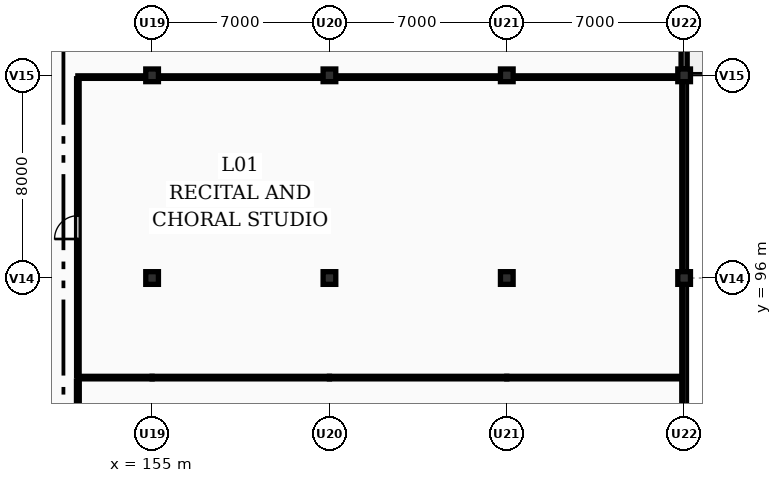
"""IFC4 building model, lengths in metres.
Left out: names, types, materials, properties, quantities, classifications, styles, units other than length and angle.
Written with IfcOpenShell. Run it as: python <this file> out.ifc"""

import sys

from ifc_helpers import new_model, si_unit, direction, frame, frame_2d, origin, origin_2d, place, context, subcontext, project, spatial, rectangle, extrude, element, fill, save


model = new_model("IFC4")
c1 = context("Model", 3, precision=1e-05, world=origin(), true_north=direction((0.0, 1.0)))
c2 = subcontext(c1, "Body", "Model", "MODEL_VIEW")
j1 = project(units=[si_unit("LENGTHUNIT", "METRE"), si_unit("PLANEANGLEUNIT", "RADIAN")], contexts=[c1])
p1 = place(None, origin())
s1 = spatial("IfcSite", under=j1, at=p1, CompositionType="ELEMENT")
p2 = place(p1, origin())
s2 = spatial("IfcBuilding", under=s1, at=p2, CompositionType="ELEMENT")
p3 = place(p2, frame((0.0, 0.0, 4.5)))
s3 = spatial("IfcBuildingStorey", under=s2, at=p3, CompositionType="ELEMENT", Elevation=4.5)
p4 = place(p3, frame((155.0, 96.0, 0.0), z_axis=(0.0, 0.0, 1.0), x_axis=(1.0, 0.0, 0.0)))
e1 = element("IfcColumn", 1, at=p4, inside=s3, PredefinedType="COLUMN", context=c2, shape_type="SweptSolid", body=[
    extrude(rectangle(XDim=0.5, YDim=0.5, at=origin_2d()), origin(), (0.0, 0.0, 1.0), 4.683),
])
p5 = place(p3, frame((155.0, 104.0, 0.0), z_axis=(0.0, 0.0, 1.0), x_axis=(1.0, 0.0, 0.0)))
e2 = element("IfcColumn", 2, at=p5, inside=s3, PredefinedType="COLUMN", context=c2, shape_type="SweptSolid", body=[
    extrude(rectangle(XDim=0.5, YDim=0.5, at=origin_2d()), origin(), (0.0, 0.0, 1.0), 3.9),
])
p6 = place(p3, frame((162.0, 96.0, 0.0), z_axis=(0.0, 0.0, 1.0), x_axis=(1.0, 0.0, 0.0)))
e3 = element("IfcColumn", 3, at=p6, inside=s3, PredefinedType="COLUMN", context=c2, shape_type="SweptSolid", body=[
    extrude(rectangle(XDim=0.5, YDim=0.5, at=origin_2d()), origin(), (0.0, 0.0, 1.0), 5.088),
])
p7 = place(p3, frame((162.0, 104.0, 0.0), z_axis=(0.0, 0.0, 1.0), x_axis=(1.0, 0.0, 0.0)))
e4 = element("IfcColumn", 4, at=p7, inside=s3, PredefinedType="COLUMN", context=c2, shape_type="SweptSolid", body=[
    extrude(rectangle(XDim=0.5, YDim=0.5, at=origin_2d()), origin(), (0.0, 0.0, 1.0), 3.9),
])
p8 = place(p3, frame((169.0, 96.0, 0.0), z_axis=(0.0, 0.0, 1.0), x_axis=(1.0, 0.0, 0.0)))
e5 = element("IfcColumn", 5, at=p8, inside=s3, PredefinedType="COLUMN", context=c2, shape_type="SweptSolid", body=[
    extrude(rectangle(XDim=0.5, YDim=0.5, at=origin_2d()), origin(), (0.0, 0.0, 1.0), 5.493),
])
p9 = place(p3, frame((169.0, 104.0, 0.0), z_axis=(0.0, 0.0, 1.0), x_axis=(1.0, 0.0, 0.0)))
e6 = element("IfcColumn", 6, at=p9, inside=s3, PredefinedType="COLUMN", context=c2, shape_type="SweptSolid", body=[
    extrude(rectangle(XDim=0.5, YDim=0.5, at=origin_2d()), origin(), (0.0, 0.0, 1.0), 3.9),
])
p10 = place(p3, frame((176.0, 96.0, 0.0), z_axis=(0.0, 0.0, 1.0), x_axis=(1.0, 0.0, 0.0)))
e7 = element("IfcColumn", 7, at=p10, inside=s3, PredefinedType="COLUMN", context=c2, shape_type="SweptSolid", body=[
    extrude(rectangle(XDim=0.5, YDim=0.5, at=origin_2d()), origin(), (0.0, 0.0, 1.0), 5.899),
])
p11 = place(p3, frame((176.0, 104.0, 0.0), z_axis=(0.0, 0.0, 1.0), x_axis=(1.0, 0.0, 0.0)))
e8 = element("IfcColumn", 8, at=p11, inside=s3, PredefinedType="COLUMN", context=c2, shape_type="SweptSolid", body=[
    extrude(rectangle(XDim=0.5, YDim=0.5, at=origin_2d()), origin(), (0.0, 0.0, 1.0), 3.9),
])
p12 = place(p3, frame((176.0, 111.75, 0.0), z_axis=(0.0, 0.0, 1.0), x_axis=(0.0, -1.0, 0.0)))
e9 = element("IfcWall", 9, at=p12, inside=s3, PredefinedType="SOLIDWALL", context=c2, shape_type="SweptSolid", body=[
    extrude(rectangle(XDim=7.5, YDim=0.24, at=frame_2d((3.75, 0.0))), origin(), (0.0, 0.0, 1.0), 2.948),
])
p13 = place(p12, frame((4.3, 0.0, 0.0)))
e10 = element("IfcOpeningElement", 10, at=p13, cuts=e9, PredefinedType="OPENING", context=c2, shape_type="SweptSolid", body=[
    extrude(rectangle(XDim=1.5, YDim=2.15, at=frame_2d((0.75, 1.075))), frame((0.0, 0.13, 0.0), z_axis=(0.0, -1.0, 0.0), x_axis=(1.0, 0.0, 0.0)), (0.0, 0.0, 1.0), 0.26),
])
for number, where, z_axis, x_axis in (
    (11, (176.0, 103.75, 0.0), (0.0, 0.0, 1.0), (0.0, -1.0, 0.0)),
    (12, (176.0, 95.75, 0.0), (0.0, 0.0, 1.0), (0.0, -1.0, 0.0)),
):
    element("IfcWall", number, at=place(p3, frame(where, z_axis=z_axis, x_axis=x_axis)), inside=s3, PredefinedType="SOLIDWALL", context=c2, shape_type="SweptSolid", body=[
        extrude(rectangle(XDim=7.5, YDim=0.185, at=frame_2d((3.75, 0.0))), origin(), (0.0, 0.0, 1.0), 0.95),
    ])
p14 = place(p3, frame((152.07, 92.07, 0.0), z_axis=(0.0, 0.0, 1.0), x_axis=(1.0, 0.0, 0.0)))
e13 = element("IfcWall", 13, at=p14, inside=s3, PredefinedType="PARTITIONING", context=c2, shape_type="SweptSolid", body=[
    extrude(rectangle(XDim=2.93, YDim=0.1, at=frame_2d((1.465, 0.0))), origin(), (0.0, 0.0, 1.0), 3.65),
])
for number, where, z_axis, x_axis in (
    (14, (155.0, 92.07, 0.0), (0.0, 0.0, 1.0), (1.0, 0.0, 0.0)),
    (15, (162.0, 92.07, 0.0), (0.0, 0.0, 1.0), (1.0, 0.0, 0.0)),
):
    element("IfcWall", number, at=place(p3, frame(where, z_axis=z_axis, x_axis=x_axis)), inside=s3, PredefinedType="PARTITIONING", context=c2, shape_type="SweptSolid", body=[
        extrude(rectangle(XDim=7.0, YDim=0.1, at=frame_2d((3.5, 0.0))), origin(), (0.0, 0.0, 1.0), 3.65),
    ])
p15 = place(p3, frame((169.0, 92.07, 0.0), z_axis=(0.0, 0.0, 1.0), x_axis=(1.0, 0.0, 0.0)))
e16 = element("IfcWall", 16, at=p15, inside=s3, PredefinedType="PARTITIONING", context=c2, shape_type="SweptSolid", body=[
    extrude(rectangle(XDim=6.865, YDim=0.1, at=frame_2d((3.433, 0.0))), origin(), (0.0, 0.0, 1.0), 3.65),
])
p16 = place(p3, frame((152.07, 103.93, 0.0), z_axis=(0.0, 0.0, 1.0), x_axis=(1.0, 0.0, 0.0)))
e17 = element("IfcWall", 17, at=p16, inside=s3, PredefinedType="PARTITIONING", context=c2, shape_type="SweptSolid", body=[
    extrude(rectangle(XDim=2.665, YDim=0.1, at=frame_2d((1.333, 0.0))), origin(), (0.0, 0.0, 1.0), 2.995),
])
for number, where, z_axis, x_axis in (
    (18, (155.265, 103.93, 0.0), (0.0, 0.0, 1.0), (1.0, 0.0, 0.0)),
    (19, (162.265, 103.93, 0.0), (0.0, 0.0, 1.0), (1.0, 0.0, 0.0)),
):
    element("IfcWall", number, at=place(p3, frame(where, z_axis=z_axis, x_axis=x_axis)), inside=s3, PredefinedType="PARTITIONING", context=c2, shape_type="SweptSolid", body=[
        extrude(rectangle(XDim=6.47, YDim=0.1, at=frame_2d((3.235, 0.0))), origin(), (0.0, 0.0, 1.0), 2.995),
    ])
p17 = place(p3, frame((169.265, 103.93, 0.0), z_axis=(0.0, 0.0, 1.0), x_axis=(1.0, 0.0, 0.0)))
e20 = element("IfcWall", 20, at=p17, inside=s3, PredefinedType="PARTITIONING", context=c2, shape_type="SweptSolid", body=[
    extrude(rectangle(XDim=6.465, YDim=0.1, at=frame_2d((3.232, 0.0))), origin(), (0.0, 0.0, 1.0), 2.998),
])
p18 = place(p3, frame((152.07, 92.135, 0.0), z_axis=(0.0, 0.0, 1.0), x_axis=(0.0, 1.0, 0.0)))
e21 = element("IfcWall", 21, at=p18, inside=s3, PredefinedType="PARTITIONING", context=c2, shape_type="SweptSolid", body=[
    extrude(rectangle(XDim=11.73, YDim=0.1, at=frame_2d((5.865, 0.0))), origin(), (0.0, 0.0, 1.0), 3.65),
])
p19 = place(p18, frame((5.405, 0.0, 0.0)))
e22 = element("IfcOpeningElement", 22, at=p19, cuts=e21, PredefinedType="OPENING", context=c2, shape_type="SweptSolid", body=[
    extrude(rectangle(XDim=0.92, YDim=2.1, at=frame_2d((0.46, 1.05))), frame((0.0, 0.06, 0.0), z_axis=(0.0, -1.0, 0.0), x_axis=(1.0, 0.0, 0.0)), (0.0, 0.0, 1.0), 0.12),
])
p20 = place(p3, frame((152.07, 80.34, 0.0), z_axis=(0.0, 0.0, 1.0), x_axis=(0.0, 1.0, 0.0)))
e23 = element("IfcWall", 23, at=p20, inside=s3, PredefinedType="PARTITIONING", context=c2, shape_type="SweptSolid", body=[
    extrude(rectangle(XDim=11.59, YDim=0.11, at=frame_2d((5.795, 0.0))), origin(), (0.0, 0.0, 1.0), 3.65),
])
p21 = place(p20, frame((5.185, 0.0, 0.0)))
e24 = element("IfcOpeningElement", 24, at=p21, cuts=e23, PredefinedType="OPENING", context=c2, shape_type="SweptSolid", body=[
    extrude(rectangle(XDim=0.95, YDim=2.1, at=frame_2d((0.475, 1.05))), frame((0.0, 0.065, 0.0), z_axis=(0.0, -1.0, 0.0), x_axis=(1.0, 0.0, 0.0)), (0.0, 0.0, 1.0), 0.13),
])
p22 = place(p19, origin())
e25 = element("IfcDoor", 25, at=p22, inside=s3, OperationType="SINGLE_SWING_LEFT", PredefinedType="DOOR", context=c2, shape_type="SweptSolid", body=[
    extrude(rectangle(XDim=0.92, YDim=2.1, at=frame_2d((0.46, 1.05))), frame((0.0, 0.025, 0.0), z_axis=(0.0, -1.0, 0.0), x_axis=(1.0, 0.0, 0.0)), (0.0, 0.0, 1.0), 0.05),
])
fill(e22, e25)
save(model, sys.argv[1])
